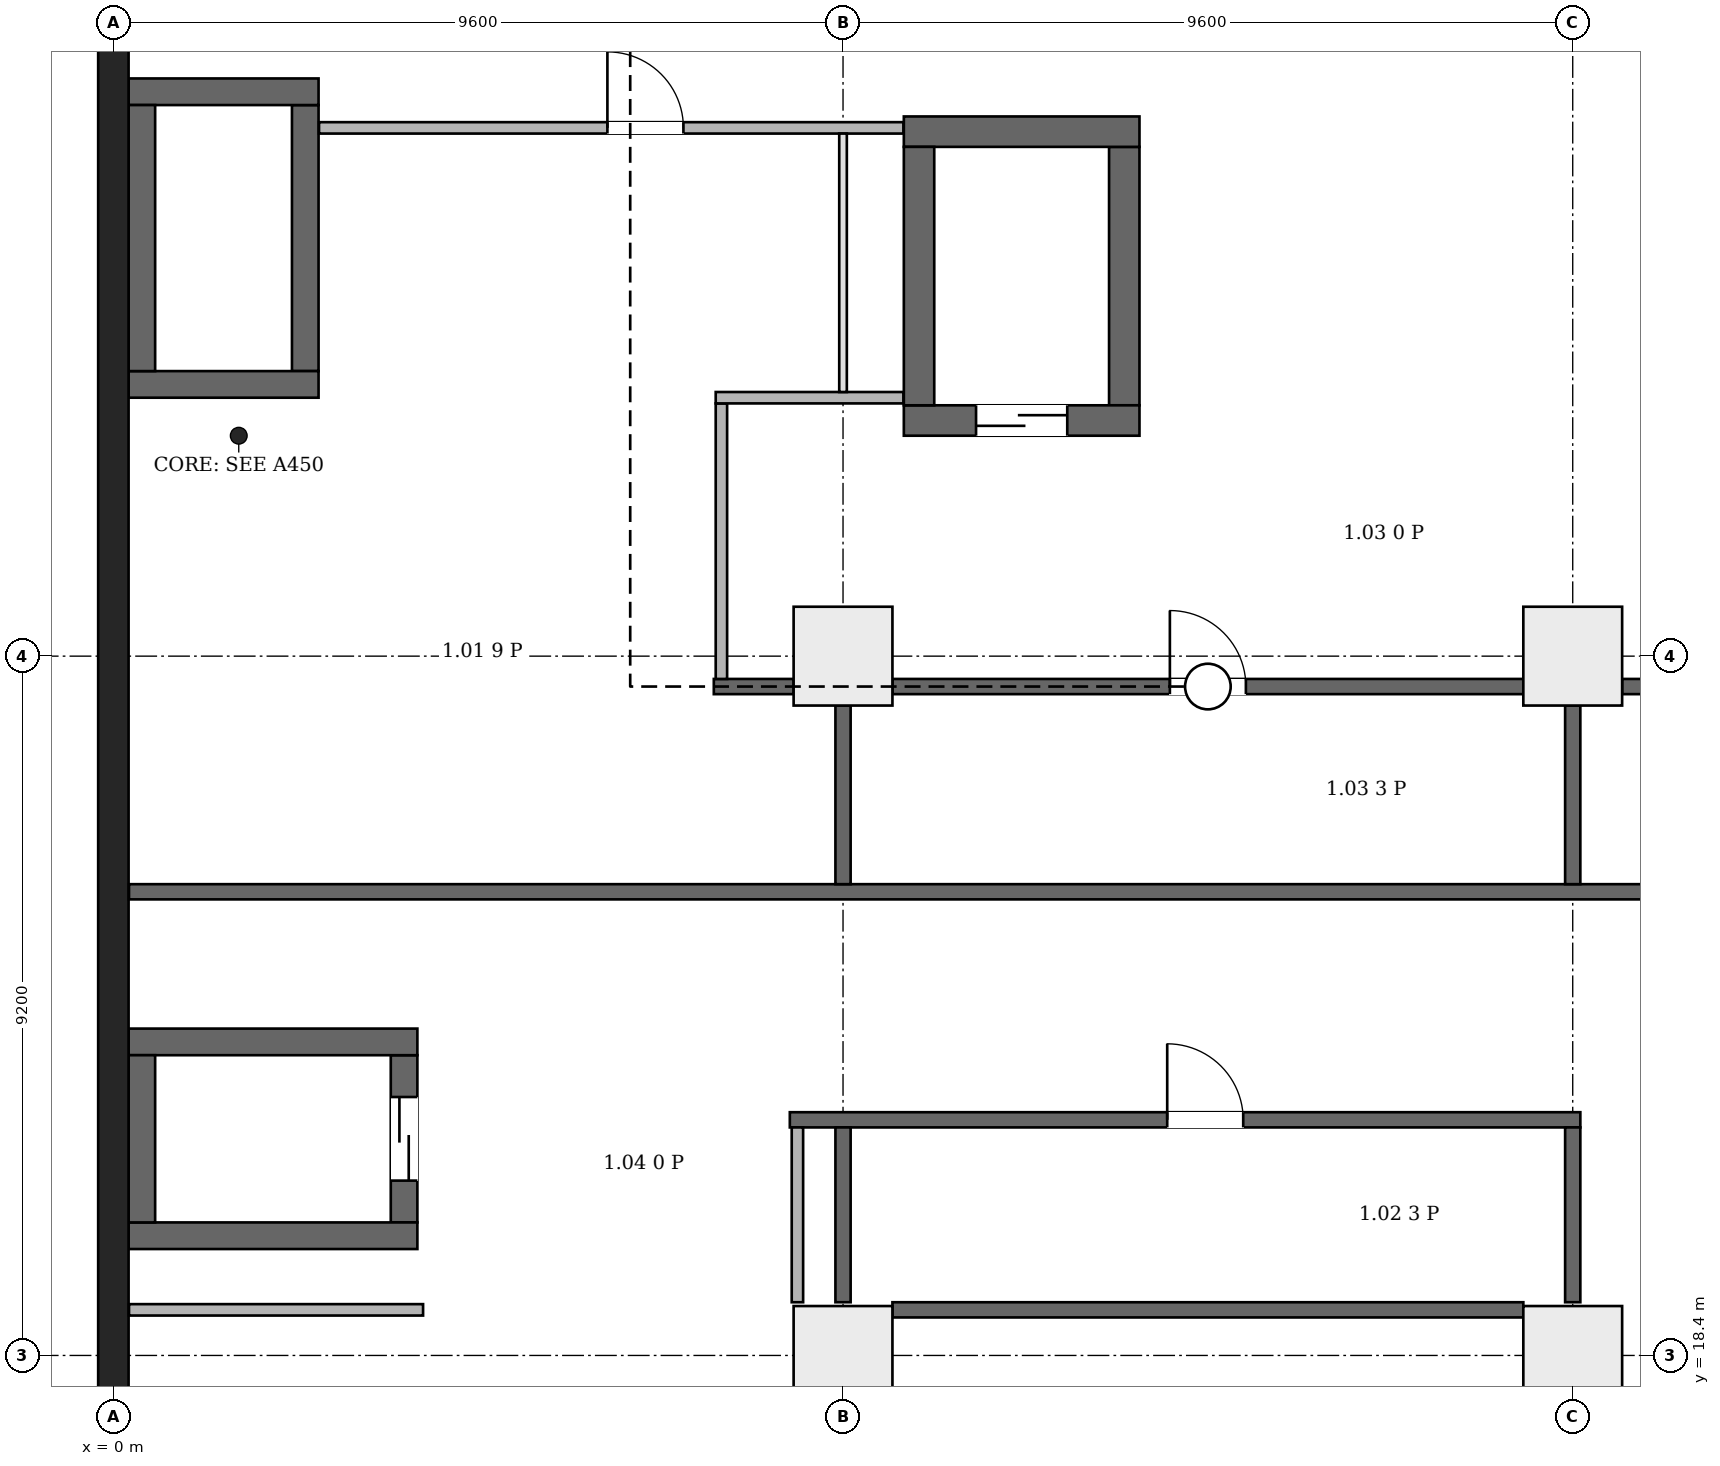
"""IFC4 building model, lengths in metres.
Left out: names, types, materials, properties, quantities, classifications, styles, units other than length and angle.
Written with IfcOpenShell. Run it as: python <this file> out.ifc"""

import sys

from ifc_helpers import new_model, si_unit, direction, frame, frame_2d, origin, origin_2d, place, context, subcontext, project, spatial, rectangle, extrude, element, fill, save


model = new_model("IFC4")
c1 = context("Model", 3, precision=1e-05, world=origin(), true_north=direction((0.0, 1.0)))
c2 = subcontext(c1, "Body", "Model", "MODEL_VIEW")
j1 = project(units=[si_unit("LENGTHUNIT", "METRE"), si_unit("PLANEANGLEUNIT", "RADIAN")], contexts=[c1])
p1 = place(None, origin())
s1 = spatial("IfcSite", under=j1, at=p1, CompositionType="ELEMENT")
p2 = place(p1, origin())
s2 = spatial("IfcBuilding", under=s1, at=p2, CompositionType="ELEMENT")
p3 = place(p2, frame((0.0, 0.0, 6.5)))
s3 = spatial("IfcBuildingStorey", under=s2, at=p3, CompositionType="ELEMENT", Elevation=6.5)
p4 = place(p3, frame((0.0, -0.2, 0.0), z_axis=(0.0, 0.0, 1.0), x_axis=(0.0, 1.0, 0.0)))
e1 = element("IfcWall", 1, at=p4, inside=s3, PredefinedType="SHEAR", context=c2, shape_type="SweptSolid", body=[
    extrude(rectangle(XDim=46.88, YDim=0.4, at=frame_2d((23.44, 0.0))), origin(), (0.0, 0.0, 1.0), 7.7),
])
for number, where, z_axis, x_axis in (
    (2, (0.2, 19.975, 0.0), (0.0, 0.0, 1.0), (1.0, 0.0, 0.0)),
    (3, (0.2, 22.525, 0.0), (0.0, 0.0, 1.0), (1.0, 0.0, 0.0)),
):
    element("IfcWall", number, at=place(p3, frame(where, z_axis=z_axis, x_axis=x_axis)), inside=s3, PredefinedType="SHEAR", context=c2, shape_type="SweptSolid", body=[
        extrude(rectangle(XDim=3.8, YDim=0.35, at=frame_2d((1.9, 0.0))), origin(), (0.0, 0.0, 1.0), 7.7),
    ])
p5 = place(p3, frame((0.375, 20.15, 0.0), z_axis=(0.0, 0.0, 1.0), x_axis=(0.0, 1.0, 0.0)))
e4 = element("IfcWall", 4, at=p5, inside=s3, PredefinedType="SHEAR", context=c2, shape_type="SweptSolid", body=[
    extrude(rectangle(XDim=2.2, YDim=0.35, at=frame_2d((1.1, 0.0))), origin(), (0.0, 0.0, 1.0), 7.7),
])
p6 = place(p3, frame((3.825, 20.15, 0.0), z_axis=(0.0, 0.0, 1.0), x_axis=(0.0, 1.0, 0.0)))
e5 = element("IfcWall", 5, at=p6, inside=s3, PredefinedType="SHEAR", context=c2, shape_type="SweptSolid", body=[
    extrude(rectangle(XDim=2.2, YDim=0.35, at=frame_2d((1.1, 0.0))), origin(), (0.0, 0.0, 1.0), 7.7),
])
p7 = place(p6, frame((0.55, 0.0, 0.0)))
e6 = element("IfcOpeningElement", 6, at=p7, cuts=e5, PredefinedType="OPENING", context=c2, shape_type="SweptSolid", body=[
    extrude(rectangle(XDim=1.1, YDim=2.1, at=frame_2d((0.55, 1.05))), frame((0.0, 0.185, 0.0), z_axis=(0.0, -1.0, 0.0), x_axis=(1.0, 0.0, 0.0)), (0.0, 0.0, 1.0), 0.37),
])
for number, where, z_axis, x_axis in (
    (7, (0.2, 31.175, 0.0), (0.0, 0.0, 1.0), (1.0, 0.0, 0.0)),
    (8, (0.2, 35.025, 0.0), (0.0, 0.0, 1.0), (1.0, 0.0, 0.0)),
):
    element("IfcWall", number, at=place(p3, frame(where, z_axis=z_axis, x_axis=x_axis)), inside=s3, PredefinedType="SHEAR", context=c2, shape_type="SweptSolid", body=[
        extrude(rectangle(XDim=2.5, YDim=0.35, at=frame_2d((1.25, 0.0))), origin(), (0.0, 0.0, 1.0), 7.7),
    ])
for number, where, z_axis, x_axis in (
    (9, (0.375, 31.35, 0.0), (0.0, 0.0, 1.0), (0.0, 1.0, 0.0)),
    (10, (2.525, 31.35, 0.0), (0.0, 0.0, 1.0), (0.0, 1.0, 0.0)),
):
    element("IfcWall", number, at=place(p3, frame(where, z_axis=z_axis, x_axis=x_axis)), inside=s3, PredefinedType="SHEAR", context=c2, shape_type="SweptSolid", body=[
        extrude(rectangle(XDim=3.5, YDim=0.35, at=frame_2d((1.75, 0.0))), origin(), (0.0, 0.0, 1.0), 7.7),
    ])
p8 = place(p3, frame((10.4, 30.7, 0.0), z_axis=(0.0, 0.0, 1.0), x_axis=(1.0, 0.0, 0.0)))
e11 = element("IfcWall", 11, at=p8, inside=s3, PredefinedType="SHEAR", context=c2, shape_type="SweptSolid", body=[
    extrude(rectangle(XDim=3.1, YDim=0.4, at=frame_2d((1.55, 0.0))), origin(), (0.0, 0.0, 1.0), 7.7),
])
p9 = place(p8, frame((0.95, 0.0, 0.0)))
e12 = element("IfcOpeningElement", 12, at=p9, cuts=e11, PredefinedType="OPENING", context=c2, shape_type="SweptSolid", body=[
    extrude(rectangle(XDim=1.2, YDim=2.1, at=frame_2d((0.6, 1.05))), frame((0.0, 0.21, 0.0), z_axis=(0.0, -1.0, 0.0), x_axis=(1.0, 0.0, 0.0)), (0.0, 0.0, 1.0), 0.42),
])
p10 = place(p3, frame((10.4, 34.5, 0.0), z_axis=(0.0, 0.0, 1.0), x_axis=(1.0, 0.0, 0.0)))
e13 = element("IfcWall", 13, at=p10, inside=s3, PredefinedType="SHEAR", context=c2, shape_type="SweptSolid", body=[
    extrude(rectangle(XDim=3.1, YDim=0.4, at=frame_2d((1.55, 0.0))), origin(), (0.0, 0.0, 1.0), 7.7),
])
for number, where, z_axis, x_axis in (
    (14, (10.6, 30.9, 0.0), (0.0, 0.0, 1.0), (0.0, 1.0, 0.0)),
    (15, (13.3, 30.9, 0.0), (0.0, 0.0, 1.0), (0.0, 1.0, 0.0)),
):
    element("IfcWall", number, at=place(p3, frame(where, z_axis=z_axis, x_axis=x_axis)), inside=s3, PredefinedType="SHEAR", context=c2, shape_type="SweptSolid", body=[
        extrude(rectangle(XDim=3.4, YDim=0.4, at=frame_2d((1.7, 0.0))), origin(), (0.0, 0.0, 1.0), 7.7),
    ])
for number, where, z_axis, x_axis in (
    (16, (9.6, 18.4, 0.0), (0.0, 0.0, 1.0), (1.0, 0.0, 0.0)),
    (17, (19.2, 18.4, 0.0), (0.0, 0.0, 1.0), (1.0, 0.0, 0.0)),
    (18, (9.6, 27.6, 0.0), (0.0, 0.0, 1.0), (1.0, 0.0, 0.0)),
    (19, (19.2, 27.6, 0.0), (0.0, 0.0, 1.0), (1.0, 0.0, 0.0)),
):
    element("IfcColumn", number, at=place(p3, frame(where, z_axis=z_axis, x_axis=x_axis)), inside=s3, PredefinedType="COLUMN", context=c2, shape_type="SweptSolid", body=[
        extrude(rectangle(XDim=1.3, YDim=1.3, at=origin_2d()), origin(), (0.0, 0.0, 1.0), 7.7),
    ])
p11 = place(p3, frame((0.206, 19.0, 0.0), z_axis=(0.0, 0.0, 1.0), x_axis=(1.0, 0.0, 0.0)))
e20 = element("IfcWall", 20, at=p11, inside=s3, PredefinedType="PARTITIONING", context=c2, shape_type="SweptSolid", body=[
    extrude(rectangle(XDim=3.869, YDim=0.15, at=frame_2d((1.935, 0.0))), origin(), (0.0, 0.0, 1.0), 7.35),
])
p12 = place(p3, frame((0.206, 24.5, 0.0), z_axis=(0.0, 0.0, 1.0), x_axis=(1.0, 0.0, 0.0)))
e21 = element("IfcWall", 21, at=p12, inside=s3, PredefinedType="PARTITIONING", context=c2, shape_type="SweptSolid", body=[
    extrude(rectangle(XDim=38.094, YDim=0.2, at=frame_2d((19.047, 0.0))), origin(), (0.0, 0.0, 1.0), 7.35),
])
p13 = place(p3, frame((2.706, 34.55, 0.0), z_axis=(0.0, 0.0, 1.0), x_axis=(1.0, 0.0, 0.0)))
e22 = element("IfcWall", 22, at=p13, inside=s3, PredefinedType="PARTITIONING", context=c2, shape_type="SweptSolid", body=[
    extrude(rectangle(XDim=7.688, YDim=0.15, at=frame_2d((3.844, 0.0))), origin(), (0.0, 0.0, 1.0), 7.35),
])
p14 = place(p13, frame((3.794, 0.0, 0.0)))
e23 = element("IfcOpeningElement", 23, at=p14, cuts=e22, PredefinedType="OPENING", context=c2, shape_type="SweptSolid", body=[
    extrude(rectangle(XDim=1.0, YDim=2.1, at=frame_2d((0.5, 1.05))), frame((0.0, 0.085, 0.0), z_axis=(0.0, -1.0, 0.0), x_axis=(1.0, 0.0, 0.0)), (0.0, 0.0, 1.0), 0.17),
])
p15 = place(p3, frame((7.9, 27.2, 0.0), z_axis=(0.0, 0.0, 1.0), x_axis=(1.0, 0.0, 0.0)))
e24 = element("IfcWall", 24, at=p15, inside=s3, PredefinedType="PARTITIONING", context=c2, shape_type="SweptSolid", body=[
    extrude(rectangle(XDim=1.05, YDim=0.2, at=frame_2d((0.525, 0.0))), origin(), (0.0, 0.0, 1.0), 7.35),
])
p16 = place(p3, frame((8.0, 27.3, 0.0), z_axis=(0.0, 0.0, 1.0), x_axis=(0.0, 1.0, 0.0)))
e25 = element("IfcWall", 25, at=p16, inside=s3, PredefinedType="PARTITIONING", context=c2, shape_type="SweptSolid", body=[
    extrude(rectangle(XDim=3.625, YDim=0.15, at=frame_2d((1.812, 0.0))), origin(), (0.0, 0.0, 1.0), 7.35),
])
p17 = place(p3, frame((7.925, 31.0, 0.0), z_axis=(0.0, 0.0, 1.0), x_axis=(1.0, 0.0, 0.0)))
e26 = element("IfcWall", 26, at=p17, inside=s3, PredefinedType="PARTITIONING", context=c2, shape_type="SweptSolid", body=[
    extrude(rectangle(XDim=2.469, YDim=0.15, at=frame_2d((1.234, 0.0))), origin(), (0.0, 0.0, 1.0), 7.35),
])
p18 = place(p3, frame((8.9, 21.5, 0.0), z_axis=(0.0, 0.0, 1.0), x_axis=(1.0, 0.0, 0.0)))
e27 = element("IfcWall", 27, at=p18, inside=s3, PredefinedType="PARTITIONING", context=c2, shape_type="SweptSolid", body=[
    extrude(rectangle(XDim=10.4, YDim=0.2, at=frame_2d((5.2, 0.0))), origin(), (0.0, 0.0, 1.0), 7.35),
])
p19 = place(p18, frame((4.965, 0.0, 0.0)))
e28 = element("IfcOpeningElement", 28, at=p19, cuts=e27, PredefinedType="OPENING", context=c2, shape_type="SweptSolid", body=[
    extrude(rectangle(XDim=1.0, YDim=2.1, at=frame_2d((0.5, 1.05))), frame((0.0, 0.11, 0.0), z_axis=(0.0, -1.0, 0.0), x_axis=(1.0, 0.0, 0.0)), (0.0, 0.0, 1.0), 0.22),
])
p20 = place(p3, frame((9.0, 19.1, 0.0), z_axis=(0.0, 0.0, 1.0), x_axis=(0.0, 1.0, 0.0)))
e29 = element("IfcWall", 29, at=p20, inside=s3, PredefinedType="PARTITIONING", context=c2, shape_type="SweptSolid", body=[
    extrude(rectangle(XDim=2.3, YDim=0.15, at=frame_2d((1.15, 0.0))), origin(), (0.0, 0.0, 1.0), 6.95),
])
p21 = place(p3, frame((9.6, 19.1, 0.0), z_axis=(0.0, 0.0, 1.0), x_axis=(0.0, 1.0, 0.0)))
e30 = element("IfcWall", 30, at=p21, inside=s3, PredefinedType="PARTITIONING", context=c2, shape_type="SweptSolid", body=[
    extrude(rectangle(XDim=2.3, YDim=0.2, at=frame_2d((1.15, 0.0))), origin(), (0.0, 0.0, 1.0), 6.95),
])
p22 = place(p3, frame((9.6, 24.6, 0.0), z_axis=(0.0, 0.0, 1.0), x_axis=(0.0, 1.0, 0.0)))
e31 = element("IfcWall", 31, at=p22, inside=s3, PredefinedType="PARTITIONING", context=c2, shape_type="SweptSolid", body=[
    extrude(rectangle(XDim=2.35, YDim=0.2, at=frame_2d((1.175, 0.0))), origin(), (0.0, 0.0, 1.0), 6.95),
])
p23 = place(p3, frame((9.6, 31.075, 0.0), z_axis=(0.0, 0.0, 1.0), x_axis=(0.0, 1.0, 0.0)))
e32 = element("IfcWall", 32, at=p23, inside=s3, PredefinedType="PARTITIONING", context=c2, shape_type="SweptSolid", body=[
    extrude(rectangle(XDim=3.4, YDim=0.1, at=frame_2d((1.7, 0.0))), origin(), (0.0, 0.0, 1.0), 6.95),
])
p24 = place(p3, frame((10.25, 19.0, 0.0), z_axis=(0.0, 0.0, 1.0), x_axis=(1.0, 0.0, 0.0)))
e33 = element("IfcWall", 33, at=p24, inside=s3, PredefinedType="PARTITIONING", context=c2, shape_type="SweptSolid", body=[
    extrude(rectangle(XDim=8.3, YDim=0.2, at=frame_2d((4.15, 0.0))), origin(), (0.0, 0.0, 1.0), 7.35),
])
p25 = place(p3, frame((10.25, 27.2, 0.0), z_axis=(0.0, 0.0, 1.0), x_axis=(1.0, 0.0, 0.0)))
e34 = element("IfcWall", 34, at=p25, inside=s3, PredefinedType="PARTITIONING", context=c2, shape_type="SweptSolid", body=[
    extrude(rectangle(XDim=8.3, YDim=0.2, at=frame_2d((4.15, 0.0))), origin(), (0.0, 0.0, 1.0), 7.35),
])
p26 = place(p25, frame((3.65, 0.0, 0.0)))
e35 = element("IfcOpeningElement", 35, at=p26, cuts=e34, PredefinedType="OPENING", context=c2, shape_type="SweptSolid", body=[
    extrude(rectangle(XDim=1.0, YDim=2.1, at=frame_2d((0.5, 1.05))), frame((0.0, 0.11, 0.0), z_axis=(0.0, -1.0, 0.0), x_axis=(1.0, 0.0, 0.0)), (0.0, 0.0, 1.0), 0.22),
])
p27 = place(p3, frame((19.2, 19.1, 0.0), z_axis=(0.0, 0.0, 1.0), x_axis=(0.0, 1.0, 0.0)))
e36 = element("IfcWall", 36, at=p27, inside=s3, PredefinedType="PARTITIONING", context=c2, shape_type="SweptSolid", body=[
    extrude(rectangle(XDim=2.3, YDim=0.2, at=frame_2d((1.15, 0.0))), origin(), (0.0, 0.0, 1.0), 6.95),
])
p28 = place(p3, frame((19.2, 24.6, 0.0), z_axis=(0.0, 0.0, 1.0), x_axis=(0.0, 1.0, 0.0)))
e37 = element("IfcWall", 37, at=p28, inside=s3, PredefinedType="PARTITIONING", context=c2, shape_type="SweptSolid", body=[
    extrude(rectangle(XDim=2.35, YDim=0.2, at=frame_2d((1.175, 0.0))), origin(), (0.0, 0.0, 1.0), 6.95),
])
p29 = place(p3, frame((19.85, 27.2, 0.0), z_axis=(0.0, 0.0, 1.0), x_axis=(1.0, 0.0, 0.0)))
e38 = element("IfcWall", 38, at=p29, inside=s3, PredefinedType="PARTITIONING", context=c2, shape_type="SweptSolid", body=[
    extrude(rectangle(XDim=8.3, YDim=0.2, at=frame_2d((4.15, 0.0))), origin(), (0.0, 0.0, 1.0), 7.35),
])
p30 = place(p29, frame((3.65, 0.0, 0.0)))
e39 = element("IfcOpeningElement", 39, at=p30, cuts=e38, PredefinedType="OPENING", context=c2, shape_type="SweptSolid", body=[
    extrude(rectangle(XDim=1.0, YDim=2.1, at=frame_2d((0.5, 1.05))), frame((0.0, 0.11, 0.0), z_axis=(0.0, -1.0, 0.0), x_axis=(1.0, 0.0, 0.0)), (0.0, 0.0, 1.0), 0.22),
])
p31 = place(p7, origin())
e40 = element("IfcDoor", 40, at=p31, inside=s3, OperationType="DOUBLE_DOOR_SLIDING", PredefinedType="DOOR", context=c2, shape_type="SweptSolid", body=[
    extrude(rectangle(XDim=1.1, YDim=2.1, at=frame_2d((0.55, 1.05))), frame((0.0, 0.025, 0.0), z_axis=(0.0, -1.0, 0.0), x_axis=(1.0, 0.0, 0.0)), (0.0, 0.0, 1.0), 0.05),
])
fill(e6, e40)
p32 = place(p9, origin())
e41 = element("IfcDoor", 41, at=p32, inside=s3, OperationType="DOUBLE_DOOR_SLIDING", PredefinedType="DOOR", context=c2, shape_type="SweptSolid", body=[
    extrude(rectangle(XDim=1.2, YDim=2.1, at=frame_2d((0.6, 1.05))), frame((0.0, 0.025, 0.0), z_axis=(0.0, -1.0, 0.0), x_axis=(1.0, 0.0, 0.0)), (0.0, 0.0, 1.0), 0.05),
])
fill(e12, e41)
p33 = place(p19, origin())
e42 = element("IfcDoor", 42, at=p33, inside=s3, OperationType="SINGLE_SWING_RIGHT", PredefinedType="DOOR", context=c2, shape_type="SweptSolid", body=[
    extrude(rectangle(XDim=1.0, YDim=2.1, at=frame_2d((0.5, 1.05))), frame((0.0, 0.025, 0.0), z_axis=(0.0, -1.0, 0.0), x_axis=(1.0, 0.0, 0.0)), (0.0, 0.0, 1.0), 0.05),
])
fill(e28, e42)
p34 = place(p14, origin())
e43 = element("IfcDoor", 43, at=p34, inside=s3, OperationType="SINGLE_SWING_LEFT", PredefinedType="DOOR", context=c2, shape_type="SweptSolid", body=[
    extrude(rectangle(XDim=1.0, YDim=2.1, at=frame_2d((0.5, 1.05))), frame((0.0, 0.025, 0.0), z_axis=(0.0, -1.0, 0.0), x_axis=(1.0, 0.0, 0.0)), (0.0, 0.0, 1.0), 0.05),
])
fill(e23, e43)
p35 = place(p26, origin())
e44 = element("IfcDoor", 44, at=p35, inside=s3, OperationType="SINGLE_SWING_RIGHT", PredefinedType="DOOR", context=c2, shape_type="SweptSolid", body=[
    extrude(rectangle(XDim=1.0, YDim=2.1, at=frame_2d((0.5, 1.05))), frame((0.0, 0.025, 0.0), z_axis=(0.0, -1.0, 0.0), x_axis=(1.0, 0.0, 0.0)), (0.0, 0.0, 1.0), 0.05),
])
fill(e35, e44)
save(model, sys.argv[1])
